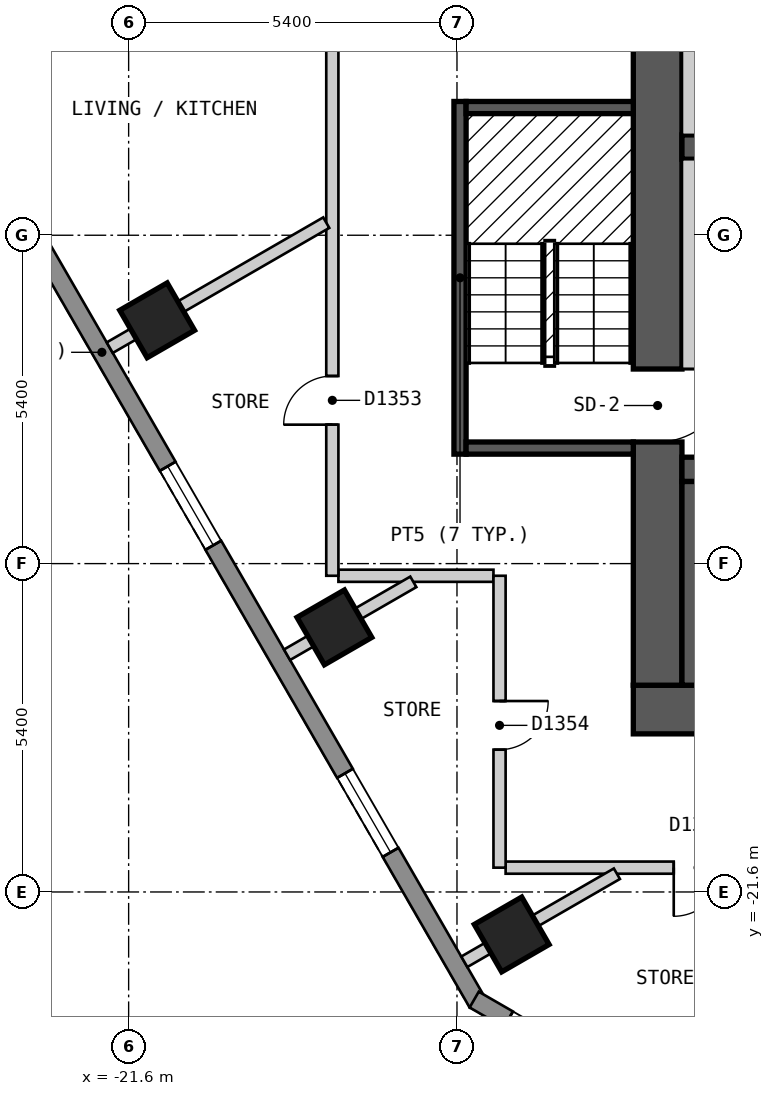
"""IFC4 building model, lengths in metres.
Left out: names, types, materials, properties, quantities, classifications, styles, units other than length and angle.
Written with IfcOpenShell. Run it as: python <this file> out.ifc"""

import sys

from ifc_helpers import new_model, si_unit, direction, frame, frame_2d, origin, origin_2d, place, context, subcontext, project, spatial, polyline, rectangle, outline, extrude, element, fill, save


model = new_model("IFC4")
c1 = context("Model", 3, precision=1e-05, world=origin(), true_north=direction((0.0, 1.0)))
c2 = subcontext(c1, "Body", "Model", "MODEL_VIEW")
j1 = project(units=[si_unit("LENGTHUNIT", "METRE"), si_unit("PLANEANGLEUNIT", "RADIAN")], contexts=[c1])
p1 = place(None, origin())
s1 = spatial("IfcSite", under=j1, at=p1, CompositionType="ELEMENT")
p2 = place(p1, origin())
s2 = spatial("IfcBuilding", under=s1, at=p2, CompositionType="ELEMENT")
p3 = place(p2, frame((0.0, 0.0, 135.6)))
s3 = spatial("IfcBuildingStorey", under=s2, at=p3, CompositionType="ELEMENT", Elevation=135.6)
for number, where, z_axis, x_axis in (
    (1, (-21.131, -12.199, 0.0), (0.0, 0.0, 1.0), (0.5, -0.866, 0.0)),
    (2, (-18.216, -17.249, 0.0), (0.0, 0.0, 1.0), (0.5, -0.866, 0.0)),
    (3, (-15.3, -22.299, 0.0), (0.0, 0.0, 1.0), (0.5, -0.866, 0.0)),
):
    element("IfcColumn", number, at=place(p3, frame(where, z_axis=z_axis, x_axis=x_axis)), inside=s3, PredefinedType="COLUMN", context=c2, shape_type="SweptSolid", body=[
        extrude(rectangle(XDim=0.9, YDim=0.9, at=origin_2d()), origin(), (0.0, 0.0, 1.0), 3.0),
    ])
p4 = place(p3, frame((-13.3, -18.6, 0.0), z_axis=(0.0, 0.0, 1.0), x_axis=(1.0, 0.0, 0.0)))
e4 = element("IfcWall", 4, at=p4, inside=s3, PredefinedType="SHEAR", context=c2, shape_type="SweptSolid", body=[
    extrude(rectangle(XDim=26.6, YDim=0.8, at=frame_2d((13.3, 0.0))), origin(), (0.0, 0.0, 1.0), 2.7),
])
p5 = place(p3, frame((-12.9, -18.2, 0.0), z_axis=(0.0, 0.0, 1.0), x_axis=(0.0, 1.0, 0.0)))
e5 = element("IfcWall", 5, at=p5, inside=s3, PredefinedType="SHEAR", context=c2, shape_type="SweptSolid", body=[
    extrude(rectangle(XDim=12.4, YDim=0.8, at=frame_2d((6.2, 0.0))), origin(), (0.0, 0.0, 1.0), 2.7),
])
p6 = place(p5, frame((4.0, 0.0, 0.0)))
e6 = element("IfcOpeningElement", 6, at=p6, cuts=e5, PredefinedType="OPENING", context=c2, shape_type="SweptSolid", body=[
    extrude(rectangle(XDim=1.2, YDim=2.1, at=frame_2d((0.6, 1.05))), frame((0.0, 0.41, 0.0), z_axis=(0.0, -1.0, 0.0), x_axis=(1.0, 0.0, 0.0)), (0.0, 0.0, 1.0), 0.82),
])
p7 = place(p3, frame((-12.5, -14.65, 0.0), z_axis=(0.0, 0.0, 1.0), x_axis=(1.0, 0.0, 0.0)))
e7 = element("IfcWall", 7, at=p7, inside=s3, PredefinedType="SHEAR", context=c2, shape_type="SweptSolid", body=[
    extrude(rectangle(XDim=25.0, YDim=0.4, at=frame_2d((12.5, 0.0))), origin(), (0.0, 0.0, 1.0), 2.7),
])
p8 = place(p7, frame((1.7, 0.0, 0.0), z_axis=(0.0, 0.0, 1.0), x_axis=(-1.0, 0.0, 0.0)))
e8 = element("IfcOpeningElement", 8, at=p8, cuts=e7, PredefinedType="OPENING", context=c2, shape_type="SweptSolid", body=[
    extrude(rectangle(XDim=1.2, YDim=2.1, at=frame_2d((0.6, 1.05))), frame((0.0, 0.21, 0.0), z_axis=(0.0, -1.0, 0.0), x_axis=(1.0, 0.0, 0.0)), (0.0, 0.0, 1.0), 0.42),
])
p9 = place(p7, frame((24.55, 0.0, 0.0), z_axis=(0.0, 0.0, 1.0), x_axis=(-1.0, 0.0, 0.0)))
e9 = element("IfcOpeningElement", 9, at=p9, cuts=e7, PredefinedType="OPENING", context=c2, shape_type="SweptSolid", body=[
    extrude(rectangle(XDim=1.2, YDim=2.1, at=frame_2d((0.6, 1.05))), frame((0.0, 0.21, 0.0), z_axis=(0.0, -1.0, 0.0), x_axis=(1.0, 0.0, 0.0)), (0.0, 0.0, 1.0), 0.42),
])
p10 = place(p7, frame((7.6, 0.0, 0.0), z_axis=(0.0, 0.0, 1.0), x_axis=(-1.0, 0.0, 0.0)))
e10 = element("IfcOpeningElement", 10, at=p10, cuts=e7, PredefinedType="OPENING", context=c2, shape_type="SweptSolid", body=[
    extrude(rectangle(XDim=0.9, YDim=2.1, at=frame_2d((0.45, 1.05))), frame((0.0, 0.21, 0.0), z_axis=(0.0, -1.0, 0.0), x_axis=(1.0, 0.0, 0.0)), (0.0, 0.0, 1.0), 0.42),
])
p11 = place(p7, frame((9.65, 0.0, 0.0), z_axis=(0.0, 0.0, 1.0), x_axis=(-1.0, 0.0, 0.0)))
e11 = element("IfcOpeningElement", 11, at=p11, cuts=e7, PredefinedType="OPENING", context=c2, shape_type="SweptSolid", body=[
    extrude(rectangle(XDim=0.9, YDim=2.1, at=frame_2d((0.45, 1.05))), frame((0.0, 0.21, 0.0), z_axis=(0.0, -1.0, 0.0), x_axis=(1.0, 0.0, 0.0)), (0.0, 0.0, 1.0), 0.42),
])
p12 = place(p7, frame((11.95, 0.0, 0.0), z_axis=(0.0, 0.0, 1.0), x_axis=(-1.0, 0.0, 0.0)))
e12 = element("IfcOpeningElement", 12, at=p12, cuts=e7, PredefinedType="OPENING", context=c2, shape_type="SweptSolid", body=[
    extrude(rectangle(XDim=1.0, YDim=2.1, at=frame_2d((0.5, 1.05))), frame((0.0, 0.21, 0.0), z_axis=(0.0, -1.0, 0.0), x_axis=(1.0, 0.0, 0.0)), (0.0, 0.0, 1.0), 0.42),
])
p13 = place(p7, frame((14.15, 0.0, 0.0), z_axis=(0.0, 0.0, 1.0), x_axis=(-1.0, 0.0, 0.0)))
e13 = element("IfcOpeningElement", 13, at=p13, cuts=e7, PredefinedType="OPENING", context=c2, shape_type="SweptSolid", body=[
    extrude(rectangle(XDim=0.9, YDim=2.1, at=frame_2d((0.45, 1.05))), frame((0.0, 0.21, 0.0), z_axis=(0.0, -1.0, 0.0), x_axis=(1.0, 0.0, 0.0)), (0.0, 0.0, 1.0), 0.42),
])
p14 = place(p7, frame((16.15, 0.0, 0.0), z_axis=(0.0, 0.0, 1.0), x_axis=(-1.0, 0.0, 0.0)))
e14 = element("IfcOpeningElement", 14, at=p14, cuts=e7, PredefinedType="OPENING", context=c2, shape_type="SweptSolid", body=[
    extrude(rectangle(XDim=0.9, YDim=2.1, at=frame_2d((0.45, 1.05))), frame((0.0, 0.21, 0.0), z_axis=(0.0, -1.0, 0.0), x_axis=(1.0, 0.0, 0.0)), (0.0, 0.0, 1.0), 0.42),
])
p15 = place(p7, frame((18.3, 0.0, 0.0), z_axis=(0.0, 0.0, 1.0), x_axis=(-1.0, 0.0, 0.0)))
e15 = element("IfcOpeningElement", 15, at=p15, cuts=e7, PredefinedType="OPENING", context=c2, shape_type="SweptSolid", body=[
    extrude(rectangle(XDim=1.0, YDim=2.1, at=frame_2d((0.5, 1.05))), frame((0.0, 0.21, 0.0), z_axis=(0.0, -1.0, 0.0), x_axis=(1.0, 0.0, 0.0)), (0.0, 0.0, 1.0), 0.42),
])
p16 = place(p3, frame((-12.5, -9.35, 0.0), z_axis=(0.0, 0.0, 1.0), x_axis=(1.0, 0.0, 0.0)))
e16 = element("IfcWall", 16, at=p16, inside=s3, PredefinedType="SHEAR", context=c2, shape_type="SweptSolid", body=[
    extrude(rectangle(XDim=22.7, YDim=0.4, at=frame_2d((11.35, 0.0))), origin(), (0.0, 0.0, 1.0), 2.7),
])
p17 = place(p16, frame((1.1, 0.0, 0.0)))
e17 = element("IfcOpeningElement", 17, at=p17, cuts=e16, PredefinedType="OPENING", context=c2, shape_type="SweptSolid", body=[
    extrude(rectangle(XDim=1.1, YDim=2.1, at=frame_2d((0.55, 1.05))), frame((0.0, 0.21, 0.0), z_axis=(0.0, -1.0, 0.0), x_axis=(1.0, 0.0, 0.0)), (0.0, 0.0, 1.0), 0.42),
])
p18 = place(p16, frame((3.9, 0.0, 0.0)))
e18 = element("IfcOpeningElement", 18, at=p18, cuts=e16, PredefinedType="OPENING", context=c2, shape_type="SweptSolid", body=[
    extrude(rectangle(XDim=1.1, YDim=2.1, at=frame_2d((0.55, 1.05))), frame((0.0, 0.21, 0.0), z_axis=(0.0, -1.0, 0.0), x_axis=(1.0, 0.0, 0.0)), (0.0, 0.0, 1.0), 0.42),
])
p19 = place(p16, frame((6.7, 0.0, 0.0)))
e19 = element("IfcOpeningElement", 19, at=p19, cuts=e16, PredefinedType="OPENING", context=c2, shape_type="SweptSolid", body=[
    extrude(rectangle(XDim=1.1, YDim=2.1, at=frame_2d((0.55, 1.05))), frame((0.0, 0.21, 0.0), z_axis=(0.0, -1.0, 0.0), x_axis=(1.0, 0.0, 0.0)), (0.0, 0.0, 1.0), 0.42),
])
p20 = place(p16, frame((9.0, 0.0, 0.0)))
e20 = element("IfcOpeningElement", 20, at=p20, cuts=e16, PredefinedType="OPENING", context=c2, shape_type="SweptSolid", body=[
    extrude(rectangle(XDim=1.1, YDim=2.1, at=frame_2d((0.55, 1.05))), frame((0.0, 0.21, 0.0), z_axis=(0.0, -1.0, 0.0), x_axis=(1.0, 0.0, 0.0)), (0.0, 0.0, 1.0), 0.42),
])
p21 = place(p16, frame((11.3, 0.0, 0.0)))
e21 = element("IfcOpeningElement", 21, at=p21, cuts=e16, PredefinedType="OPENING", context=c2, shape_type="SweptSolid", body=[
    extrude(rectangle(XDim=1.1, YDim=2.1, at=frame_2d((0.55, 1.05))), frame((0.0, 0.21, 0.0), z_axis=(0.0, -1.0, 0.0), x_axis=(1.0, 0.0, 0.0)), (0.0, 0.0, 1.0), 0.42),
])
p22 = place(p16, frame((13.6, 0.0, 0.0)))
e22 = element("IfcOpeningElement", 22, at=p22, cuts=e16, PredefinedType="OPENING", context=c2, shape_type="SweptSolid", body=[
    extrude(rectangle(XDim=1.1, YDim=2.1, at=frame_2d((0.55, 1.05))), frame((0.0, 0.21, 0.0), z_axis=(0.0, -1.0, 0.0), x_axis=(1.0, 0.0, 0.0)), (0.0, 0.0, 1.0), 0.42),
])
p23 = place(p16, frame((15.9, 0.0, 0.0)))
e23 = element("IfcOpeningElement", 23, at=p23, cuts=e16, PredefinedType="OPENING", context=c2, shape_type="SweptSolid", body=[
    extrude(rectangle(XDim=1.1, YDim=2.1, at=frame_2d((0.55, 1.05))), frame((0.0, 0.21, 0.0), z_axis=(0.0, -1.0, 0.0), x_axis=(1.0, 0.0, 0.0)), (0.0, 0.0, 1.0), 0.42),
])
p24 = place(p16, frame((18.2, 0.0, 0.0)))
e24 = element("IfcOpeningElement", 24, at=p24, cuts=e16, PredefinedType="OPENING", context=c2, shape_type="SweptSolid", body=[
    extrude(rectangle(XDim=1.1, YDim=2.1, at=frame_2d((0.55, 1.05))), frame((0.0, 0.21, 0.0), z_axis=(0.0, -1.0, 0.0), x_axis=(1.0, 0.0, 0.0)), (0.0, 0.0, 1.0), 0.42),
])
p25 = place(p16, frame((20.6, 0.0, 0.0)))
e25 = element("IfcOpeningElement", 25, at=p25, cuts=e16, PredefinedType="OPENING", context=c2, shape_type="SweptSolid", body=[
    extrude(rectangle(XDim=1.1, YDim=2.1, at=frame_2d((0.55, 1.05))), frame((0.0, 0.21, 0.0), z_axis=(0.0, -1.0, 0.0), x_axis=(1.0, 0.0, 0.0)), (0.0, 0.0, 1.0), 0.42),
])
p26 = place(p3, frame((-28.218, -2.025, 0.0), z_axis=(0.0, 0.0, 1.0), x_axis=(0.500017503135, -0.866015298109, 0.0)))
e26 = element("IfcWall", 26, at=p26, inside=s3, PredefinedType="SOLIDWALL", context=c2, shape_type="SweptSolid", body=[
    extrude(outline(polyline([(0.0, -0.15), (24.711, -0.15), (24.631, 0.15), (0.08, 0.15), (0.0, -0.15)])), origin(), (0.0, 0.0, 1.0), 2.7),
])
p27 = place(p26, frame((2.857, 0.0, 0.15)))
e27 = element("IfcOpeningElement", 27, at=p27, cuts=e26, PredefinedType="OPENING", context=c2, shape_type="SweptSolid", body=[
    extrude(rectangle(XDim=1.5, YDim=2.1, at=frame_2d((0.75, 1.05))), frame((0.0, 0.16, 0.0), z_axis=(0.0, -1.0, 0.0), x_axis=(1.0, 0.0, 0.0)), (0.0, 0.0, 1.0), 0.32),
])
p28 = place(p26, frame((8.689, 0.0, 0.15)))
e28 = element("IfcOpeningElement", 28, at=p28, cuts=e26, PredefinedType="OPENING", context=c2, shape_type="SweptSolid", body=[
    extrude(rectangle(XDim=1.5, YDim=2.1, at=frame_2d((0.75, 1.05))), frame((0.0, 0.16, 0.0), z_axis=(0.0, -1.0, 0.0), x_axis=(1.0, 0.0, 0.0)), (0.0, 0.0, 1.0), 0.32),
])
p29 = place(p26, frame((14.52, 0.0, 0.15)))
e29 = element("IfcOpeningElement", 29, at=p29, cuts=e26, PredefinedType="OPENING", context=c2, shape_type="SweptSolid", body=[
    extrude(rectangle(XDim=1.5, YDim=2.1, at=frame_2d((0.75, 1.05))), frame((0.0, 0.16, 0.0), z_axis=(0.0, -1.0, 0.0), x_axis=(1.0, 0.0, 0.0)), (0.0, 0.0, 1.0), 0.32),
])
p30 = place(p26, frame((20.351, 0.0, 0.15)))
e30 = element("IfcOpeningElement", 30, at=p30, cuts=e26, PredefinedType="OPENING", context=c2, shape_type="SweptSolid", body=[
    extrude(rectangle(XDim=1.5, YDim=2.1, at=frame_2d((0.75, 1.05))), frame((0.0, 0.16, 0.0), z_axis=(0.0, -1.0, 0.0), x_axis=(1.0, 0.0, 0.0)), (0.0, 0.0, 1.0), 0.32),
])
p31 = place(p3, frame((-15.917, -23.37, 0.0), z_axis=(0.0, 0.0, 1.0), x_axis=(0.866022959057, -0.500004234368, 0.0)))
e31 = element("IfcWall", 31, at=p31, inside=s3, PredefinedType="SOLIDWALL", context=c2, shape_type="SweptSolid", body=[
    extrude(outline(polyline([(0.0, -0.15), (5.0, -0.15), (4.92, 0.15), (0.08, 0.15), (0.0, -0.15)])), origin(), (0.0, 0.0, 1.0), 2.7),
])
p32 = place(p31, frame((0.65, 0.0, 0.15)))
e32 = element("IfcOpeningElement", 32, at=p32, cuts=e31, PredefinedType="OPENING", context=c2, shape_type="SweptSolid", body=[
    extrude(rectangle(XDim=1.2, YDim=2.1, at=frame_2d((0.6, 1.05))), frame((0.0, 0.16, 0.0), z_axis=(0.0, -1.0, 0.0), x_axis=(1.0, 0.0, 0.0)), (0.0, 0.0, 1.0), 0.32),
])
p33 = place(p3, frame((-18.15, -16.4, 0.0), z_axis=(0.0, 0.0, 1.0), x_axis=(1.0, 0.0, 0.0)))
e33 = element("IfcWall", 33, at=p33, inside=s3, PredefinedType="PARTITIONING", context=c2, shape_type="SweptSolid", body=[
    extrude(rectangle(XDim=2.55, YDim=0.2, at=frame_2d((1.275, 0.0))), origin(), (0.0, 0.0, 1.0), 2.7),
])
p34 = place(p3, frame((-15.4, -21.2, 0.0), z_axis=(0.0, 0.0, 1.0), x_axis=(1.0, 0.0, 0.0)))
e34 = element("IfcWall", 34, at=p34, inside=s3, PredefinedType="PARTITIONING", context=c2, shape_type="SweptSolid", body=[
    extrude(rectangle(XDim=30.799, YDim=0.2, at=frame_2d((15.399, 0.0))), origin(), (0.0, 0.0, 1.0), 2.7),
])
p35 = place(p34, frame((17.643, 0.0, 0.0)))
e35 = element("IfcOpeningElement", 35, at=p35, cuts=e34, PredefinedType="OPENING", context=c2, shape_type="SweptSolid", body=[
    extrude(rectangle(XDim=1.0, YDim=2.1, at=frame_2d((0.5, 1.05))), frame((0.0, 0.11, 0.0), z_axis=(0.0, -1.0, 0.0), x_axis=(1.0, 0.0, 0.0)), (0.0, 0.0, 1.0), 0.22),
])
p36 = place(p34, frame((2.765, 0.0, 0.0)))
e36 = element("IfcOpeningElement", 36, at=p36, cuts=e34, PredefinedType="OPENING", context=c2, shape_type="SweptSolid", body=[
    extrude(rectangle(XDim=0.8, YDim=2.1, at=frame_2d((0.4, 1.05))), frame((0.0, 0.11, 0.0), z_axis=(0.0, -1.0, 0.0), x_axis=(1.0, 0.0, 0.0)), (0.0, 0.0, 1.0), 0.22),
])
p37 = place(p3, frame((-15.5, -21.2, 0.0), z_axis=(0.0, 0.0, 1.0), x_axis=(0.0, 1.0, 0.0)))
e37 = element("IfcWall", 37, at=p37, inside=s3, PredefinedType="PARTITIONING", context=c2, shape_type="SweptSolid", body=[
    extrude(rectangle(XDim=4.8, YDim=0.2, at=frame_2d((2.4, 0.0))), origin(), (0.0, 0.0, 1.0), 2.7),
])
p38 = place(p37, frame((1.94, 0.0, 0.0)))
e38 = element("IfcOpeningElement", 38, at=p38, cuts=e37, PredefinedType="OPENING", context=c2, shape_type="SweptSolid", body=[
    extrude(rectangle(XDim=0.8, YDim=2.1, at=frame_2d((0.4, 1.05))), frame((0.0, 0.11, 0.0), z_axis=(0.0, -1.0, 0.0), x_axis=(1.0, 0.0, 0.0)), (0.0, 0.0, 1.0), 0.22),
])
p39 = place(p3, frame((-18.25, -16.4, 0.0), z_axis=(0.0, 0.0, 1.0), x_axis=(0.0, 1.0, 0.0)))
e39 = element("IfcWall", 39, at=p39, inside=s3, PredefinedType="PARTITIONING", context=c2, shape_type="SweptSolid", body=[
    extrude(rectangle(XDim=9.799, YDim=0.2, at=frame_2d((4.899, 0.0))), origin(), (0.0, 0.0, 1.0), 2.7),
])
p40 = place(p39, frame((2.485, 0.0, 0.0)))
e40 = element("IfcOpeningElement", 40, at=p40, cuts=e39, PredefinedType="OPENING", context=c2, shape_type="SweptSolid", body=[
    extrude(rectangle(XDim=0.8, YDim=2.1, at=frame_2d((0.4, 1.05))), frame((0.0, 0.11, 0.0), z_axis=(0.0, -1.0, 0.0), x_axis=(1.0, 0.0, 0.0)), (0.0, 0.0, 1.0), 0.22),
])
p41 = place(p3, frame((-18.995, -17.699, 0.0), z_axis=(0.0, 0.0, 1.0), x_axis=(0.86607371389, 0.499916315105, 0.0)))
e41 = element("IfcWall", 41, at=p41, inside=s3, PredefinedType="PARTITIONING", context=c2, shape_type="SweptSolid", body=[
    extrude(rectangle(XDim=2.398, YDim=0.2, at=frame_2d((1.199, 0.0))), origin(), (0.0, 0.0, 1.0), 2.7),
])
p42 = place(p3, frame((-16.079, -22.748, 0.0), z_axis=(0.0, 0.0, 1.0), x_axis=(0.866114021284, 0.499846478567, 0.0)))
e42 = element("IfcWall", 42, at=p42, inside=s3, PredefinedType="PARTITIONING", context=c2, shape_type="SweptSolid", body=[
    extrude(rectangle(XDim=2.897, YDim=0.2, at=frame_2d((1.448, 0.0))), origin(), (0.0, 0.0, 1.0), 2.7),
])
p43 = place(p3, frame((-21.911, -12.649, 0.0), z_axis=(0.0, 0.0, 1.0), x_axis=(0.866016499285, 0.500015422728, 0.0)))
e43 = element("IfcWall", 43, at=p43, inside=s3, PredefinedType="PARTITIONING", context=c2, shape_type="SweptSolid", body=[
    extrude(rectangle(XDim=4.112, YDim=0.2, at=frame_2d((2.056, 0.0))), origin(), (0.0, 0.0, 1.0), 2.7),
])
p44 = place(p3, frame((-16.15, -14.4, 0.0), z_axis=(0.0, 0.0, 1.0), x_axis=(0.0, 1.0, 0.0)))
e44 = element("IfcWall", 44, at=p44, inside=s3, PredefinedType="SOLIDWALL", context=c2, shape_type="SweptSolid", body=[
    extrude(rectangle(XDim=5.8, YDim=0.2, at=frame_2d((2.9, 0.0))), origin(), (0.0, 0.0, 1.0), 2.7),
])
for number, where, z_axis, x_axis in (
    (45, (-16.05, -14.3, 0.0), (0.0, 0.0, 1.0), (1.0, 0.0, 0.0)),
    (46, (-16.05, -8.7, 0.0), (0.0, 0.0, 1.0), (1.0, 0.0, 0.0)),
):
    element("IfcWall", number, at=place(p3, frame(where, z_axis=z_axis, x_axis=x_axis)), inside=s3, PredefinedType="SOLIDWALL", context=c2, shape_type="SweptSolid", body=[
        extrude(rectangle(XDim=2.75, YDim=0.2, at=frame_2d((1.375, 0.0))), origin(), (0.0, 0.0, 1.0), 2.7),
    ])
p45 = place(p3, frame((-12.3, -18.2, 0.0), z_axis=(0.0, 0.0, 1.0), x_axis=(0.0, 1.0, 0.0)))
e47 = element("IfcWall", 47, at=p45, inside=s3, PredefinedType="SOLIDWALL", context=c2, shape_type="SweptSolid", body=[
    extrude(rectangle(XDim=3.35, YDim=0.4, at=frame_2d((1.675, 0.0))), origin(), (0.0, 0.0, 1.0), 2.7),
])
p46 = place(p3, frame((-12.3, -13.0, 0.0), z_axis=(0.0, 0.0, 1.0), x_axis=(0.0, 1.0, 0.0)))
e48 = element("IfcWall", 48, at=p46, inside=s3, PredefinedType="PARTITIONING", context=c2, shape_type="SweptSolid", body=[
    extrude(rectangle(XDim=3.45, YDim=0.4, at=frame_2d((1.725, 0.0))), origin(), (0.0, 0.0, 1.0), 2.7),
])
p47 = place(p3, frame((-12.3, -9.15, 0.0), z_axis=(0.0, 0.0, 1.0), x_axis=(0.0, 1.0, 0.0)))
e49 = element("IfcWall", 49, at=p47, inside=s3, PredefinedType="SOLIDWALL", context=c2, shape_type="SweptSolid", body=[
    extrude(rectangle(XDim=3.35, YDim=0.4, at=frame_2d((1.675, 0.0))), origin(), (0.0, 0.0, 1.0), 2.7),
])
p48 = place(p29, origin())
e50 = element("IfcWindow", 50, at=p48, inside=s3, PartitioningType="SINGLE_PANEL", PredefinedType="WINDOW", context=c2, shape_type="SweptSolid", body=[
    extrude(rectangle(XDim=1.5, YDim=2.1, at=frame_2d((0.75, 1.05))), frame((0.0, 0.03, 0.0), z_axis=(0.0, -1.0, 0.0), x_axis=(1.0, 0.0, 0.0)), (0.0, 0.0, 1.0), 0.06),
])
fill(e29, e50)
p49 = place(p30, origin())
e51 = element("IfcWindow", 51, at=p49, inside=s3, PartitioningType="SINGLE_PANEL", PredefinedType="WINDOW", context=c2, shape_type="SweptSolid", body=[
    extrude(rectangle(XDim=1.5, YDim=2.1, at=frame_2d((0.75, 1.05))), frame((0.0, 0.03, 0.0), z_axis=(0.0, -1.0, 0.0), x_axis=(1.0, 0.0, 0.0)), (0.0, 0.0, 1.0), 0.06),
])
fill(e30, e51)
p50 = place(p40, origin())
e52 = element("IfcDoor", 52, at=p50, inside=s3, OperationType="SINGLE_SWING_LEFT", PredefinedType="DOOR", context=c2, shape_type="SweptSolid", body=[
    extrude(rectangle(XDim=0.8, YDim=2.1, at=frame_2d((0.4, 1.05))), frame((0.0, 0.025, 0.0), z_axis=(0.0, -1.0, 0.0), x_axis=(1.0, 0.0, 0.0)), (0.0, 0.0, 1.0), 0.05),
])
fill(e40, e52)
p51 = place(p38, origin())
e53 = element("IfcDoor", 53, at=p51, inside=s3, OperationType="SINGLE_SWING_RIGHT", PredefinedType="DOOR", context=c2, shape_type="SweptSolid", body=[
    extrude(rectangle(XDim=0.8, YDim=2.1, at=frame_2d((0.4, 1.05))), frame((0.0, 0.025, 0.0), z_axis=(0.0, -1.0, 0.0), x_axis=(1.0, 0.0, 0.0)), (0.0, 0.0, 1.0), 0.05),
])
fill(e38, e53)
p52 = place(p36, origin())
e54 = element("IfcDoor", 54, at=p52, inside=s3, OperationType="SINGLE_SWING_LEFT", PredefinedType="DOOR", context=c2, shape_type="SweptSolid", body=[
    extrude(rectangle(XDim=0.8, YDim=2.1, at=frame_2d((0.4, 1.05))), frame((0.0, 0.025, 0.0), z_axis=(0.0, -1.0, 0.0), x_axis=(1.0, 0.0, 0.0)), (0.0, 0.0, 1.0), 0.05),
])
fill(e36, e54)
p53 = place(p6, origin())
e55 = element("IfcDoor", 55, at=p53, inside=s3, OperationType="SINGLE_SWING_RIGHT", PredefinedType="DOOR", context=c2, shape_type="SweptSolid", body=[
    extrude(rectangle(XDim=1.2, YDim=2.1, at=frame_2d((0.6, 1.05))), frame((0.0, 0.025, 0.0), z_axis=(0.0, -1.0, 0.0), x_axis=(1.0, 0.0, 0.0)), (0.0, 0.0, 1.0), 0.05),
])
fill(e6, e55)
save(model, sys.argv[1])
